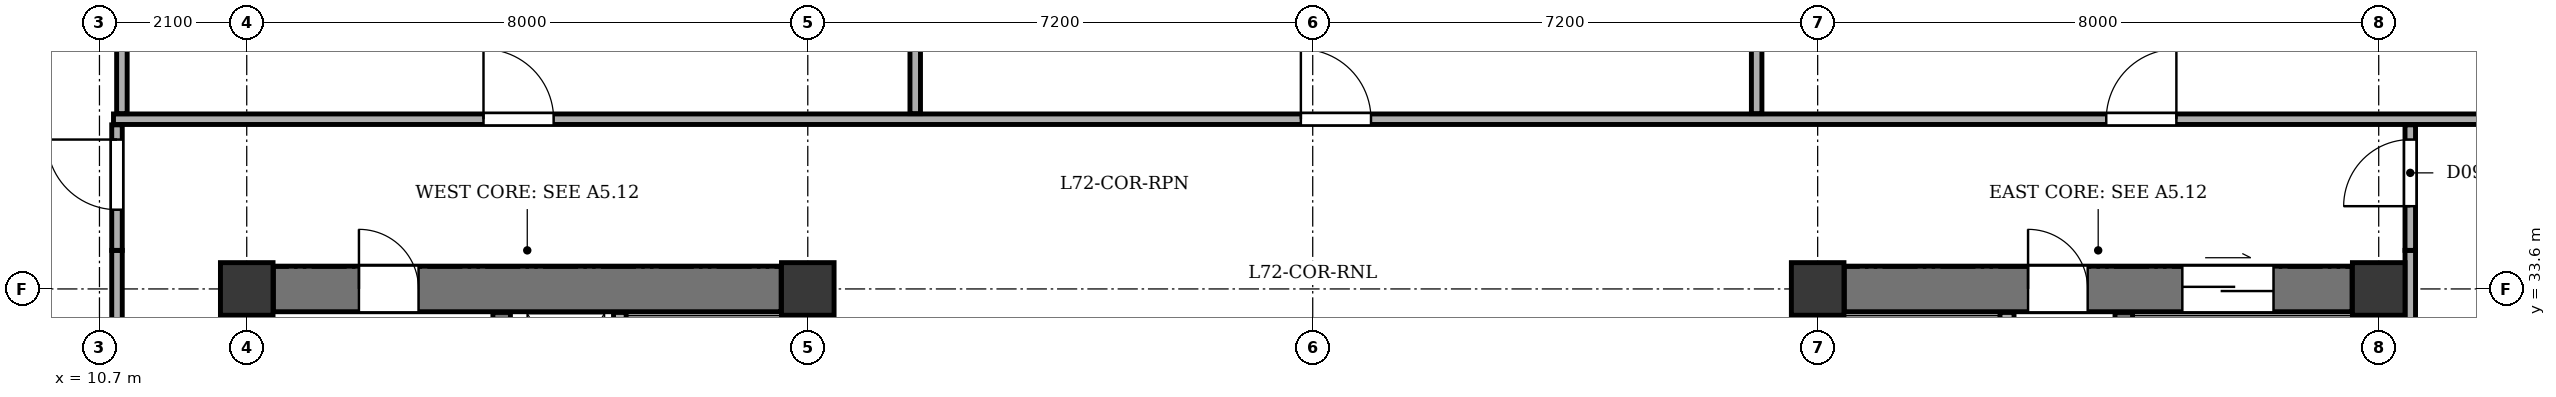
"""IFC4 building model, lengths in metres.
Left out: names, types, materials, properties, quantities, classifications, styles, units other than length and angle.
Written with IfcOpenShell. Run it as: python <this file> out.ifc"""

import sys

from ifc_helpers import new_model, si_unit, direction, frame, frame_2d, origin, origin_2d, place, context, subcontext, project, spatial, rectangle, extrude, element, fill, save


model = new_model("IFC4")
c1 = context("Model", 3, precision=1e-05, world=origin(), true_north=direction((0.0, 1.0)))
c2 = subcontext(c1, "Body", "Model", "MODEL_VIEW")
j1 = project(units=[si_unit("LENGTHUNIT", "METRE"), si_unit("PLANEANGLEUNIT", "RADIAN")], contexts=[c1])
p1 = place(None, origin())
s1 = spatial("IfcSite", under=j1, at=p1, CompositionType="ELEMENT")
p2 = place(p1, origin())
s2 = spatial("IfcBuilding", under=s1, at=p2, CompositionType="ELEMENT")
p3 = place(p2, frame((0.0, 0.0, 272.1)))
s3 = spatial("IfcBuildingStorey", under=s2, at=p3, CompositionType="ELEMENT", Elevation=272.1)
for number, where, z_axis, x_axis in (
    (1, (12.8, 33.6, 0.0), (0.0, 0.0, 1.0), (1.0, 0.0, 0.0)),
    (2, (20.8, 33.6, 0.0), (0.0, 0.0, 1.0), (1.0, 0.0, 0.0)),
    (3, (35.2, 33.6, 0.0), (0.0, 0.0, 1.0), (1.0, 0.0, 0.0)),
    (4, (43.2, 33.6, 0.0), (0.0, 0.0, 1.0), (1.0, 0.0, 0.0)),
):
    element("IfcColumn", number, at=place(p3, frame(where, z_axis=z_axis, x_axis=x_axis)), inside=s3, PredefinedType="COLUMN", context=c2, shape_type="SweptSolid", body=[
        extrude(rectangle(XDim=0.75, YDim=0.75, at=origin_2d()), origin(), (0.0, 0.0, 1.0), 3.4),
    ])
p4 = place(p3, frame((12.8, 21.18, 0.0), z_axis=(0.0, 0.0, 1.0), x_axis=(0.0, 1.0, 0.0)))
e5 = element("IfcWall", 5, at=p4, inside=s3, PredefinedType="SHEAR", context=c2, shape_type="SweptSolid", body=[
    extrude(rectangle(XDim=12.04, YDim=0.65, at=frame_2d((6.02, 0.0))), origin(), (0.0, 0.0, 1.0), 3.1),
])
p5 = place(p3, frame((13.18, 33.6, 0.0), z_axis=(0.0, 0.0, 1.0), x_axis=(1.0, 0.0, 0.0)))
e6 = element("IfcWall", 6, at=p5, inside=s3, PredefinedType="SHEAR", context=c2, shape_type="SweptSolid", body=[
    extrude(rectangle(XDim=7.24, YDim=0.65, at=frame_2d((3.62, 0.0))), origin(), (0.0, 0.0, 1.0), 3.1),
])
p6 = place(p5, frame((1.22, 0.0, 0.0)))
e7 = element("IfcOpeningElement", 7, at=p6, cuts=e6, PredefinedType="OPENING", context=c2, shape_type="SweptSolid", body=[
    extrude(rectangle(XDim=0.85, YDim=2.02, at=frame_2d((0.425, 1.01))), frame((0.0, 0.335, 0.0), z_axis=(0.0, -1.0, 0.0), x_axis=(1.0, 0.0, 0.0)), (0.0, 0.0, 1.0), 0.67),
])
p7 = place(p3, frame((20.8, 31.1, 0.0), z_axis=(0.0, 0.0, 1.0), x_axis=(0.0, 1.0, 0.0)))
e8 = element("IfcWall", 8, at=p7, inside=s3, PredefinedType="SHEAR", context=c2, shape_type="SweptSolid", body=[
    extrude(rectangle(XDim=2.12, YDim=0.65, at=frame_2d((1.06, 0.0))), origin(), (0.0, 0.0, 1.0), 3.1),
])
p8 = place(p7, frame((0.4, 0.0, 0.0)))
e9 = element("IfcOpeningElement", 9, at=p8, cuts=e8, PredefinedType="OPENING", context=c2, shape_type="SweptSolid", body=[
    extrude(rectangle(XDim=1.1, YDim=2.1, at=frame_2d((0.55, 1.05))), frame((0.0, 0.335, 0.0), z_axis=(0.0, -1.0, 0.0), x_axis=(1.0, 0.0, 0.0)), (0.0, 0.0, 1.0), 0.67),
])
p9 = place(p3, frame((16.435, 21.135, 0.0), z_axis=(0.0, 0.0, 1.0), x_axis=(0.0, 1.0, 0.0)))
e10 = element("IfcWall", 10, at=p9, inside=s3, PredefinedType="SHEAR", context=c2, shape_type="SweptSolid", body=[
    extrude(rectangle(XDim=12.13, YDim=0.25, at=frame_2d((6.065, 0.0))), origin(), (0.0, 0.0, 1.0), 3.1),
])
p10 = place(p9, frame((0.515, 0.0, 0.0)))
e11 = element("IfcOpeningElement", 11, at=p10, cuts=e10, PredefinedType="OPENING", context=c2, shape_type="SweptSolid", body=[
    extrude(rectangle(XDim=1.2, YDim=2.15, at=frame_2d((0.6, 1.075))), frame((0.0, 0.135, 0.0), z_axis=(0.0, -1.0, 0.0), x_axis=(1.0, 0.0, 0.0)), (0.0, 0.0, 1.0), 0.27),
])
p11 = place(p9, frame((2.665, 0.0, 0.0)))
e12 = element("IfcOpeningElement", 12, at=p11, cuts=e10, PredefinedType="OPENING", context=c2, shape_type="SweptSolid", body=[
    extrude(rectangle(XDim=1.15, YDim=2.15, at=frame_2d((0.575, 1.075))), frame((0.0, 0.135, 0.0), z_axis=(0.0, -1.0, 0.0), x_axis=(1.0, 0.0, 0.0)), (0.0, 0.0, 1.0), 0.27),
])
p12 = place(p3, frame((18.12, 31.17, 0.0), z_axis=(0.0, 0.0, 1.0), x_axis=(0.0, 1.0, 0.0)))
e13 = element("IfcWall", 13, at=p12, inside=s3, PredefinedType="PARTITIONING", context=c2, shape_type="SweptSolid", body=[
    extrude(rectangle(XDim=2.095, YDim=0.18, at=frame_2d((1.047, 0.0))), origin(), (0.0, 0.0, 1.0), 3.1),
])
p13 = place(p3, frame((43.2, 21.18, 0.0), z_axis=(0.0, 0.0, 1.0), x_axis=(0.0, 1.0, 0.0)))
e14 = element("IfcWall", 14, at=p13, inside=s3, PredefinedType="SHEAR", context=c2, shape_type="SweptSolid", body=[
    extrude(rectangle(XDim=12.04, YDim=0.65, at=frame_2d((6.02, 0.0))), origin(), (0.0, 0.0, 1.0), 3.1),
])
p14 = place(p3, frame((35.58, 33.6, 0.0), z_axis=(0.0, 0.0, 1.0), x_axis=(1.0, 0.0, 0.0)))
e15 = element("IfcWall", 15, at=p14, inside=s3, PredefinedType="SHEAR", context=c2, shape_type="SweptSolid", body=[
    extrude(rectangle(XDim=7.24, YDim=0.65, at=frame_2d((3.62, 0.0))), origin(), (0.0, 0.0, 1.0), 3.1),
])
p15 = place(p14, frame((4.82, 0.0, 0.0)))
e16 = element("IfcOpeningElement", 16, at=p15, cuts=e15, PredefinedType="OPENING", context=c2, shape_type="SweptSolid", body=[
    extrude(rectangle(XDim=1.3, YDim=2.15, at=frame_2d((0.65, 1.075))), frame((0.0, 0.335, 0.0), z_axis=(0.0, -1.0, 0.0), x_axis=(1.0, 0.0, 0.0)), (0.0, 0.0, 1.0), 0.67),
])
p16 = place(p14, frame((2.62, 0.0, 0.0)))
e17 = element("IfcOpeningElement", 17, at=p16, cuts=e15, PredefinedType="OPENING", context=c2, shape_type="SweptSolid", body=[
    extrude(rectangle(XDim=0.85, YDim=2.02, at=frame_2d((0.425, 1.01))), frame((0.0, 0.335, 0.0), z_axis=(0.0, -1.0, 0.0), x_axis=(1.0, 0.0, 0.0)), (0.0, 0.0, 1.0), 0.67),
])
p17 = place(p3, frame((35.2, 31.1, 0.0), z_axis=(0.0, 0.0, 1.0), x_axis=(0.0, 1.0, 0.0)))
e18 = element("IfcWall", 18, at=p17, inside=s3, PredefinedType="SHEAR", context=c2, shape_type="SweptSolid", body=[
    extrude(rectangle(XDim=2.12, YDim=0.65, at=frame_2d((1.06, 0.0))), origin(), (0.0, 0.0, 1.0), 3.1),
])
p18 = place(p17, frame((0.4, 0.0, 0.0)))
e19 = element("IfcOpeningElement", 19, at=p18, cuts=e18, PredefinedType="OPENING", context=c2, shape_type="SweptSolid", body=[
    extrude(rectangle(XDim=1.1, YDim=2.1, at=frame_2d((0.55, 1.05))), frame((0.0, 0.335, 0.0), z_axis=(0.0, -1.0, 0.0), x_axis=(1.0, 0.0, 0.0)), (0.0, 0.0, 1.0), 0.67),
])
p19 = place(p3, frame((39.565, 21.135, 0.0), z_axis=(0.0, 0.0, 1.0), x_axis=(0.0, 1.0, 0.0)))
e20 = element("IfcWall", 20, at=p19, inside=s3, PredefinedType="SHEAR", context=c2, shape_type="SweptSolid", body=[
    extrude(rectangle(XDim=12.13, YDim=0.25, at=frame_2d((6.065, 0.0))), origin(), (0.0, 0.0, 1.0), 3.1),
])
p20 = place(p19, frame((0.515, 0.0, 0.0)))
e21 = element("IfcOpeningElement", 21, at=p20, cuts=e20, PredefinedType="OPENING", context=c2, shape_type="SweptSolid", body=[
    extrude(rectangle(XDim=1.2, YDim=2.15, at=frame_2d((0.6, 1.075))), frame((0.0, 0.135, 0.0), z_axis=(0.0, -1.0, 0.0), x_axis=(1.0, 0.0, 0.0)), (0.0, 0.0, 1.0), 0.27),
])
p21 = place(p19, frame((2.665, 0.0, 0.0)))
e22 = element("IfcOpeningElement", 22, at=p21, cuts=e20, PredefinedType="OPENING", context=c2, shape_type="SweptSolid", body=[
    extrude(rectangle(XDim=1.15, YDim=2.15, at=frame_2d((0.575, 1.075))), frame((0.0, 0.135, 0.0), z_axis=(0.0, -1.0, 0.0), x_axis=(1.0, 0.0, 0.0)), (0.0, 0.0, 1.0), 0.27),
])
p22 = place(p3, frame((37.9, 25.27, 0.0), z_axis=(0.0, 0.0, 1.0), x_axis=(0.0, 1.0, 0.0)))
e23 = element("IfcWall", 23, at=p22, inside=s3, PredefinedType="SOLIDWALL", context=c2, shape_type="SweptSolid", body=[
    extrude(rectangle(XDim=7.995, YDim=0.2, at=frame_2d((3.998, 0.0))), origin(), (0.0, 0.0, 1.0), 3.1),
])
p23 = place(p3, frame((10.9, 36.02, 0.0), z_axis=(0.0, 0.0, 1.0), x_axis=(1.0, 0.0, 0.0)))
e24 = element("IfcWall", 24, at=p23, inside=s3, PredefinedType="PARTITIONING", context=c2, shape_type="SweptSolid", body=[
    extrude(rectangle(XDim=34.52, YDim=0.15, at=frame_2d((17.26, 0.0))), origin(), (0.0, 0.0, 1.0), 3.1),
])
p24 = place(p23, frame((5.276, 0.0, 0.0)))
e25 = element("IfcOpeningElement", 25, at=p24, cuts=e24, PredefinedType="OPENING", context=c2, shape_type="SweptSolid", body=[
    extrude(rectangle(XDim=1.0, YDim=2.1, at=frame_2d((0.5, 1.05))), frame((0.0, 0.085, 0.0), z_axis=(0.0, -1.0, 0.0), x_axis=(1.0, 0.0, 0.0)), (0.0, 0.0, 1.0), 0.17),
])
p25 = place(p23, frame((16.931, 0.0, 0.0)))
e26 = element("IfcOpeningElement", 26, at=p25, cuts=e24, PredefinedType="OPENING", context=c2, shape_type="SweptSolid", body=[
    extrude(rectangle(XDim=1.0, YDim=2.1, at=frame_2d((0.5, 1.05))), frame((0.0, 0.085, 0.0), z_axis=(0.0, -1.0, 0.0), x_axis=(1.0, 0.0, 0.0)), (0.0, 0.0, 1.0), 0.17),
])
p26 = place(p23, frame((28.415, 0.0, 0.0)))
e27 = element("IfcOpeningElement", 27, at=p26, cuts=e24, PredefinedType="OPENING", context=c2, shape_type="SweptSolid", body=[
    extrude(rectangle(XDim=1.0, YDim=2.1, at=frame_2d((0.5, 1.05))), frame((0.0, 0.085, 0.0), z_axis=(0.0, -1.0, 0.0), x_axis=(1.0, 0.0, 0.0)), (0.0, 0.0, 1.0), 0.17),
])
p27 = place(p3, frame((11.02, 36.1, 0.0), z_axis=(0.0, 0.0, 1.0), x_axis=(0.0, 1.0, 0.0)))
e28 = element("IfcWall", 28, at=p27, inside=s3, PredefinedType="PARTITIONING", context=c2, shape_type="SweptSolid", body=[
    extrude(rectangle(XDim=8.655, YDim=0.15, at=frame_2d((4.327, 0.0))), origin(), (0.0, 0.0, 1.0), 3.1),
])
p28 = place(p3, frame((22.332, 36.1, 0.0), z_axis=(0.0, 0.0, 1.0), x_axis=(0.0, 1.0, 0.0)))
e29 = element("IfcWall", 29, at=p28, inside=s3, PredefinedType="PARTITIONING", context=c2, shape_type="SweptSolid", body=[
    extrude(rectangle(XDim=8.655, YDim=0.15, at=frame_2d((4.327, 0.0))), origin(), (0.0, 0.0, 1.0), 2.725),
])
p29 = place(p3, frame((34.33, 36.1, 0.0), z_axis=(0.0, 0.0, 1.0), x_axis=(0.0, 1.0, 0.0)))
e30 = element("IfcWall", 30, at=p29, inside=s3, PredefinedType="PARTITIONING", context=c2, shape_type="SweptSolid", body=[
    extrude(rectangle(XDim=8.655, YDim=0.15, at=frame_2d((4.327, 0.0))), origin(), (0.0, 0.0, 1.0), 3.1),
])
p30 = place(p3, frame((10.95, 20.25, 0.0), z_axis=(0.0, 0.0, 1.0), x_axis=(0.0, 1.0, 0.0)))
e31 = element("IfcWall", 31, at=p30, inside=s3, PredefinedType="PARTITIONING", context=c2, shape_type="SweptSolid", body=[
    extrude(rectangle(XDim=13.9, YDim=0.15, at=frame_2d((6.95, 0.0))), origin(), (0.0, 0.0, 1.0), 3.1),
])
p31 = place(p3, frame((10.95, 34.15, 0.0), z_axis=(0.0, 0.0, 1.0), x_axis=(0.0, 1.0, 0.0)))
e32 = element("IfcWall", 32, at=p31, inside=s3, PredefinedType="PARTITIONING", context=c2, shape_type="SweptSolid", body=[
    extrude(rectangle(XDim=1.79, YDim=0.15, at=frame_2d((0.895, 0.0))), origin(), (0.0, 0.0, 1.0), 3.1),
])
p32 = place(p31, frame((0.58, 0.0, 0.0)))
e33 = element("IfcOpeningElement", 33, at=p32, cuts=e32, PredefinedType="OPENING", context=c2, shape_type="SweptSolid", body=[
    extrude(rectangle(XDim=1.0, YDim=2.1, at=frame_2d((0.5, 1.05))), frame((0.0, 0.085, 0.0), z_axis=(0.0, -1.0, 0.0), x_axis=(1.0, 0.0, 0.0)), (0.0, 0.0, 1.0), 0.17),
])
p33 = place(p3, frame((43.65, 20.88, 0.0), z_axis=(0.0, 0.0, 1.0), x_axis=(0.0, 1.0, 0.0)))
e34 = element("IfcWall", 34, at=p33, inside=s3, PredefinedType="PARTITIONING", context=c2, shape_type="SweptSolid", body=[
    extrude(rectangle(XDim=13.27, YDim=0.15, at=frame_2d((6.635, 0.0))), origin(), (0.0, 0.0, 1.0), 3.1),
])
p34 = place(p3, frame((43.65, 34.15, 0.0), z_axis=(0.0, 0.0, 1.0), x_axis=(0.0, 1.0, 0.0)))
e35 = element("IfcWall", 35, at=p34, inside=s3, PredefinedType="PARTITIONING", context=c2, shape_type="SweptSolid", body=[
    extrude(rectangle(XDim=1.79, YDim=0.15, at=frame_2d((0.895, 0.0))), origin(), (0.0, 0.0, 1.0), 3.1),
])
p35 = place(p34, frame((0.63, 0.0, 0.0)))
e36 = element("IfcOpeningElement", 36, at=p35, cuts=e35, PredefinedType="OPENING", context=c2, shape_type="SweptSolid", body=[
    extrude(rectangle(XDim=0.95, YDim=2.1, at=frame_2d((0.475, 1.05))), frame((0.0, 0.085, 0.0), z_axis=(0.0, -1.0, 0.0), x_axis=(1.0, 0.0, 0.0)), (0.0, 0.0, 1.0), 0.17),
])
p36 = place(p6, origin())
e37 = element("IfcDoor", 37, at=p36, inside=s3, OperationType="SINGLE_SWING_LEFT", PredefinedType="DOOR", context=c2, shape_type="SweptSolid", body=[
    extrude(rectangle(XDim=0.85, YDim=2.02, at=frame_2d((0.425, 1.01))), frame((0.0, 0.025, 0.0), z_axis=(0.0, -1.0, 0.0), x_axis=(1.0, 0.0, 0.0)), (0.0, 0.0, 1.0), 0.05),
])
fill(e7, e37)
p37 = place(p15, origin())
e38 = element("IfcDoor", 38, at=p37, inside=s3, OperationType="DOUBLE_DOOR_SLIDING", PredefinedType="DOOR", context=c2, shape_type="SweptSolid", body=[
    extrude(rectangle(XDim=1.3, YDim=2.15, at=frame_2d((0.65, 1.075))), frame((0.0, 0.025, 0.0), z_axis=(0.0, -1.0, 0.0), x_axis=(1.0, 0.0, 0.0)), (0.0, 0.0, 1.0), 0.05),
])
fill(e16, e38)
p38 = place(p16, origin())
e39 = element("IfcDoor", 39, at=p38, inside=s3, OperationType="SINGLE_SWING_LEFT", PredefinedType="DOOR", context=c2, shape_type="SweptSolid", body=[
    extrude(rectangle(XDim=0.85, YDim=2.02, at=frame_2d((0.425, 1.01))), frame((0.0, 0.025, 0.0), z_axis=(0.0, -1.0, 0.0), x_axis=(1.0, 0.0, 0.0)), (0.0, 0.0, 1.0), 0.05),
])
fill(e17, e39)
p39 = place(p24, origin())
e40 = element("IfcDoor", 40, at=p39, inside=s3, OperationType="SINGLE_SWING_LEFT", PredefinedType="DOOR", context=c2, shape_type="SweptSolid", body=[
    extrude(rectangle(XDim=1.0, YDim=2.1, at=frame_2d((0.5, 1.05))), frame((0.0, 0.025, 0.0), z_axis=(0.0, -1.0, 0.0), x_axis=(1.0, 0.0, 0.0)), (0.0, 0.0, 1.0), 0.05),
])
fill(e25, e40)
p40 = place(p25, origin())
e41 = element("IfcDoor", 41, at=p40, inside=s3, OperationType="SINGLE_SWING_LEFT", PredefinedType="DOOR", context=c2, shape_type="SweptSolid", body=[
    extrude(rectangle(XDim=1.0, YDim=2.1, at=frame_2d((0.5, 1.05))), frame((0.0, 0.025, 0.0), z_axis=(0.0, -1.0, 0.0), x_axis=(1.0, 0.0, 0.0)), (0.0, 0.0, 1.0), 0.05),
])
fill(e26, e41)
p41 = place(p26, origin())
e42 = element("IfcDoor", 42, at=p41, inside=s3, OperationType="SINGLE_SWING_RIGHT", PredefinedType="DOOR", context=c2, shape_type="SweptSolid", body=[
    extrude(rectangle(XDim=1.0, YDim=2.1, at=frame_2d((0.5, 1.05))), frame((0.0, 0.025, 0.0), z_axis=(0.0, -1.0, 0.0), x_axis=(1.0, 0.0, 0.0)), (0.0, 0.0, 1.0), 0.05),
])
fill(e27, e42)
p42 = place(p32, origin())
e43 = element("IfcDoor", 43, at=p42, inside=s3, OperationType="SINGLE_SWING_RIGHT", PredefinedType="DOOR", context=c2, shape_type="SweptSolid", body=[
    extrude(rectangle(XDim=1.0, YDim=2.1, at=frame_2d((0.5, 1.05))), frame((0.0, 0.025, 0.0), z_axis=(0.0, -1.0, 0.0), x_axis=(1.0, 0.0, 0.0)), (0.0, 0.0, 1.0), 0.05),
])
fill(e33, e43)
p43 = place(p35, origin())
e44 = element("IfcDoor", 44, at=p43, inside=s3, OperationType="SINGLE_SWING_LEFT", PredefinedType="DOOR", context=c2, shape_type="SweptSolid", body=[
    extrude(rectangle(XDim=0.95, YDim=2.1, at=frame_2d((0.475, 1.05))), frame((0.0, 0.025, 0.0), z_axis=(0.0, -1.0, 0.0), x_axis=(1.0, 0.0, 0.0)), (0.0, 0.0, 1.0), 0.05),
])
fill(e36, e44)
save(model, sys.argv[1])
